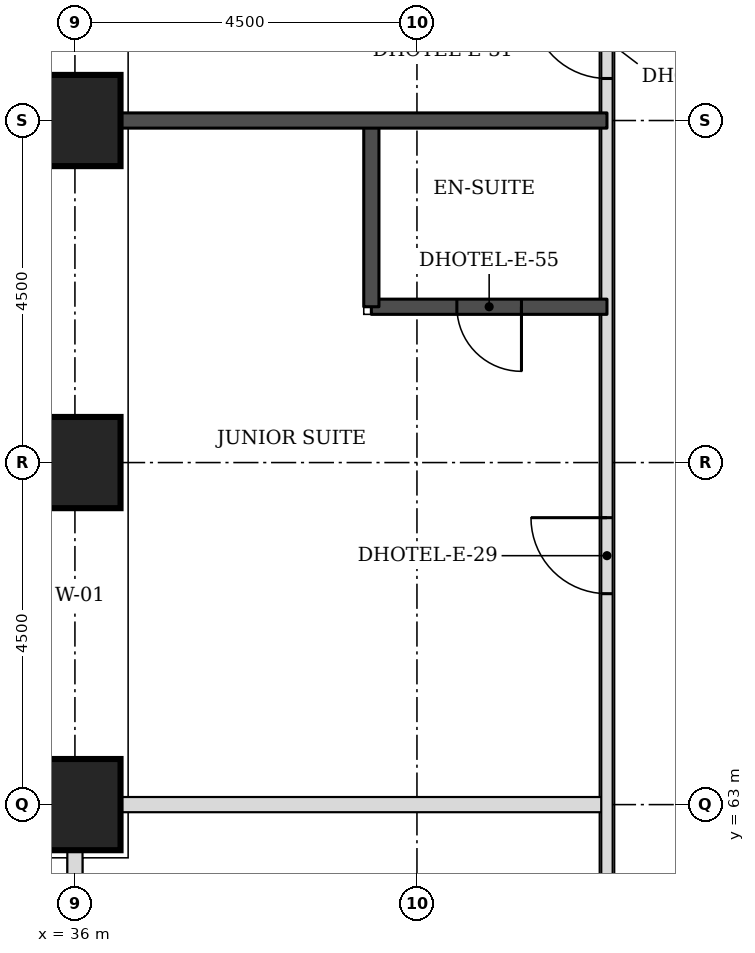
"""IFC4 building model, lengths in metres.
Left out: names, types, materials, properties, quantities, classifications, styles, units other than length and angle.
Written with IfcOpenShell. Run it as: python <this file> out.ifc"""

import sys

from ifc_helpers import new_model, si_unit, direction, frame, frame_2d, origin, origin_2d, place, context, subcontext, project, spatial, rectangle, extrude, element, fill, save


model = new_model("IFC4")
c1 = context("Model", 3, precision=1e-05, world=origin(), true_north=direction((0.0, 1.0)))
c2 = subcontext(c1, "Body", "Model", "MODEL_VIEW")
j1 = project(units=[si_unit("LENGTHUNIT", "METRE"), si_unit("PLANEANGLEUNIT", "RADIAN")], contexts=[c1])
p1 = place(None, origin())
s1 = spatial("IfcSite", under=j1, at=p1, CompositionType="ELEMENT")
p2 = place(p1, origin())
s2 = spatial("IfcBuilding", under=s1, at=p2, CompositionType="ELEMENT")
p3 = place(p2, frame((0.0, 0.0, 39.6)))
s3 = spatial("IfcBuildingStorey", under=s2, at=p3, CompositionType="ELEMENT", Elevation=39.6)
for number, where, z_axis, x_axis in (
    (1, (36.0, 63.0, 0.0), (0.0, 0.0, 1.0), (1.0, 0.0, 0.0)),
    (2, (36.0, 67.5, 0.0), (0.0, 0.0, 1.0), (1.0, 0.0, 0.0)),
    (3, (36.0, 72.0, 0.0), (0.0, 0.0, 1.0), (1.0, 0.0, 0.0)),
):
    element("IfcColumn", number, at=place(p3, frame(where, z_axis=z_axis, x_axis=x_axis)), inside=s3, PredefinedType="COLUMN", context=c2, shape_type="SweptSolid", body=[
        extrude(rectangle(XDim=1.2, YDim=1.2, at=origin_2d()), origin(), (0.0, 0.0, 1.0), 3.3),
    ])
p4 = place(p3, frame((36.0, 57.35, 0.0), z_axis=(0.0, 0.0, 1.0), x_axis=(0.0, 1.0, 0.0)))
e4 = element("IfcWall", 4, at=p4, inside=s3, PredefinedType="PARTITIONING", context=c2, shape_type="SweptSolid", body=[
    extrude(rectangle(XDim=5.05, YDim=0.2, at=frame_2d((2.525, 0.0))), origin(), (0.0, 0.0, 1.0), 2.33),
])
p5 = place(p3, frame((36.6, 63.0, 0.0), z_axis=(0.0, 0.0, 1.0), x_axis=(1.0, 0.0, 0.0)))
e5 = element("IfcWall", 5, at=p5, inside=s3, PredefinedType="PARTITIONING", context=c2, shape_type="SweptSolid", body=[
    extrude(rectangle(XDim=6.4, YDim=0.2, at=frame_2d((3.2, 0.0))), origin(), (0.0, 0.0, 1.0), 3.08),
])
p6 = place(p3, frame((43.0, 57.35, 0.0), z_axis=(0.0, 0.0, 1.0), x_axis=(0.0, 1.0, 0.0)))
e6 = element("IfcWall", 6, at=p6, inside=s3, PredefinedType="PARTITIONING", context=c2, shape_type="SweptSolid", body=[
    extrude(rectangle(XDim=16.65, YDim=0.15, at=frame_2d((8.325, 0.0))), origin(), (0.0, 0.0, 1.0), 3.08),
])
p7 = place(p6, frame((8.425, 0.0, 0.0)))
e7 = element("IfcOpeningElement", 7, at=p7, cuts=e6, PredefinedType="OPENING", context=c2, shape_type="SweptSolid", body=[
    extrude(rectangle(XDim=1.0, YDim=2.1, at=frame_2d((0.5, 1.05))), frame((0.0, 0.085, 0.0), z_axis=(0.0, -1.0, 0.0), x_axis=(1.0, 0.0, 0.0)), (0.0, 0.0, 1.0), 0.17),
])
p8 = place(p6, frame((15.203, 0.0, 0.0)))
e8 = element("IfcOpeningElement", 8, at=p8, cuts=e6, PredefinedType="OPENING", context=c2, shape_type="SweptSolid", body=[
    extrude(rectangle(XDim=1.0, YDim=2.1, at=frame_2d((0.5, 1.05))), frame((0.0, 0.085, 0.0), z_axis=(0.0, -1.0, 0.0), x_axis=(1.0, 0.0, 0.0)), (0.0, 0.0, 1.0), 0.17),
])
p9 = place(p3, frame((39.9, 69.55, 0.0), z_axis=(0.0, 0.0, 1.0), x_axis=(1.0, 0.0, 0.0)))
e9 = element("IfcWall", 9, at=p9, inside=s3, PredefinedType="SOLIDWALL", context=c2, shape_type="SweptSolid", body=[
    extrude(rectangle(XDim=3.1, YDim=0.2, at=frame_2d((1.55, 0.0))), origin(), (0.0, 0.0, 1.0), 3.08),
])
p10 = place(p9, frame((1.125, 0.0, 0.0)))
e10 = element("IfcOpeningElement", 10, at=p10, cuts=e9, PredefinedType="OPENING", context=c2, shape_type="SweptSolid", body=[
    extrude(rectangle(XDim=0.85, YDim=2.1, at=frame_2d((0.425, 1.05))), frame((0.0, 0.11, 0.0), z_axis=(0.0, -1.0, 0.0), x_axis=(1.0, 0.0, 0.0)), (0.0, 0.0, 1.0), 0.22),
])
p11 = place(p3, frame((39.9, 69.55, 0.0), z_axis=(0.0, 0.0, 1.0), x_axis=(0.0, 1.0, 0.0)))
e11 = element("IfcWall", 11, at=p11, inside=s3, PredefinedType="SOLIDWALL", context=c2, shape_type="SweptSolid", body=[
    extrude(rectangle(XDim=2.45, YDim=0.2, at=frame_2d((1.225, 0.0))), origin(), (0.0, 0.0, 1.0), 3.08),
])
p12 = place(p3, frame((36.6, 72.0, 0.0), z_axis=(0.0, 0.0, 1.0), x_axis=(1.0, 0.0, 0.0)))
e12 = element("IfcWall", 12, at=p12, inside=s3, PredefinedType="SOLIDWALL", context=c2, shape_type="SweptSolid", body=[
    extrude(rectangle(XDim=6.4, YDim=0.2, at=frame_2d((3.2, 0.0))), origin(), (0.0, 0.0, 1.0), 3.08),
])
p13 = place(p7, origin())
e13 = element("IfcDoor", 13, at=p13, inside=s3, OperationType="SINGLE_SWING_RIGHT", PredefinedType="DOOR", context=c2, shape_type="SweptSolid", body=[
    extrude(rectangle(XDim=1.0, YDim=2.1, at=frame_2d((0.5, 1.05))), frame((0.0, 0.025, 0.0), z_axis=(0.0, -1.0, 0.0), x_axis=(1.0, 0.0, 0.0)), (0.0, 0.0, 1.0), 0.05),
])
fill(e7, e13)
p14 = place(p10, frame((0.85, 0.0, 0.0), z_axis=(0.0, 0.0, 1.0), x_axis=(-1.0, 0.0, 0.0)))
e14 = element("IfcDoor", 14, at=p14, inside=s3, OperationType="SINGLE_SWING_LEFT", PredefinedType="DOOR", context=c2, shape_type="SweptSolid", body=[
    extrude(rectangle(XDim=0.85, YDim=2.1, at=frame_2d((0.425, 1.05))), frame((0.0, 0.025, 0.0), z_axis=(0.0, -1.0, 0.0), x_axis=(1.0, 0.0, 0.0)), (0.0, 0.0, 1.0), 0.05),
])
fill(e10, e14)
p15 = place(p8, origin())
e15 = element("IfcDoor", 15, at=p15, inside=s3, OperationType="SINGLE_SWING_RIGHT", PredefinedType="DOOR", context=c2, shape_type="SweptSolid", body=[
    extrude(rectangle(XDim=1.0, YDim=2.1, at=frame_2d((0.5, 1.05))), frame((0.0, 0.025, 0.0), z_axis=(0.0, -1.0, 0.0), x_axis=(1.0, 0.0, 0.0)), (0.0, 0.0, 1.0), 0.05),
])
fill(e8, e15)
save(model, sys.argv[1])
